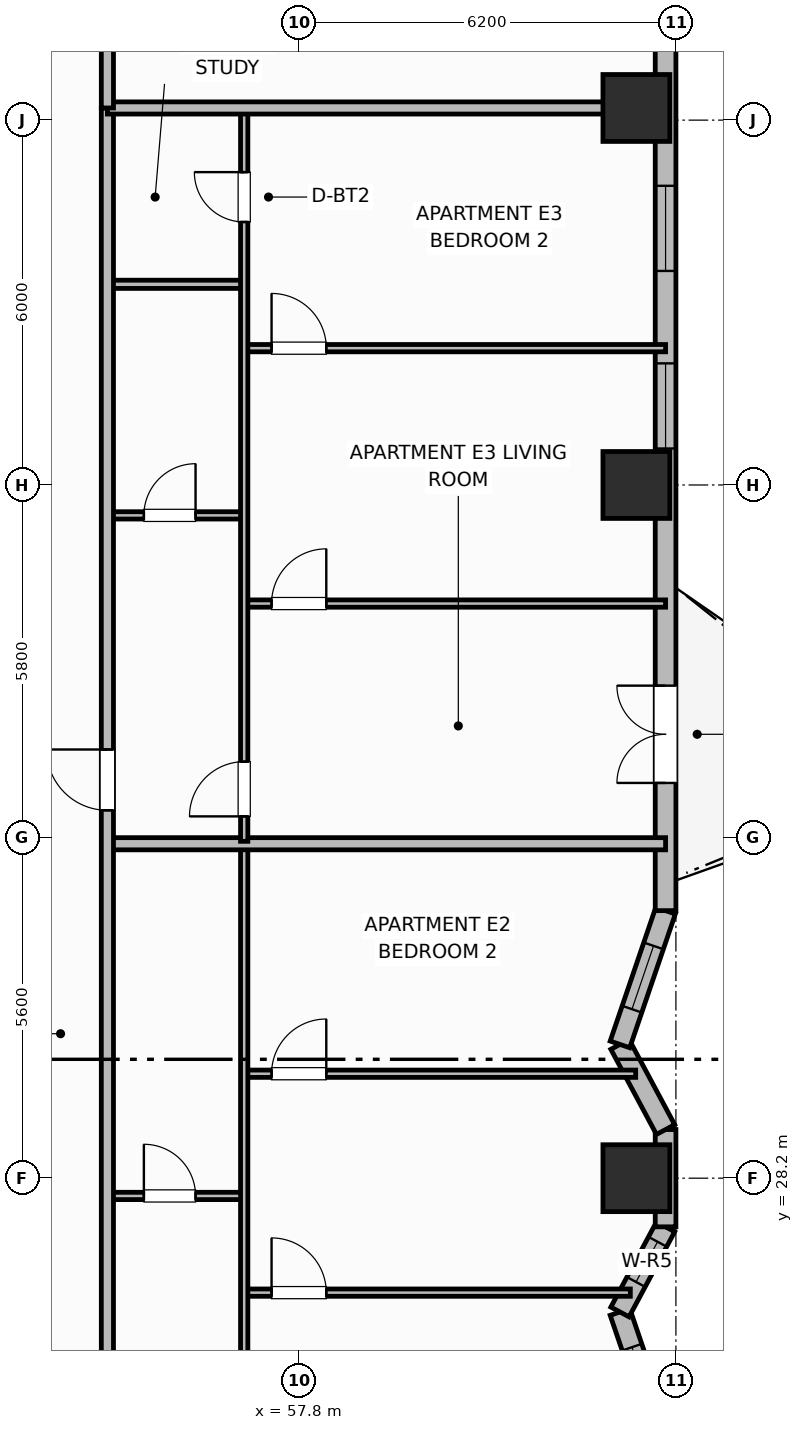
"""IFC4 building model, lengths in metres.
Left out: names, types, materials, properties, quantities, classifications, styles, units other than length and angle.
Written with IfcOpenShell. Run it as: python <this file> out.ifc"""

import sys

from ifc_helpers import new_model, si_unit, direction, frame, frame_2d, origin, origin_2d, place, context, subcontext, project, spatial, rectangle, extrude, element, fill, save


model = new_model("IFC4")
c1 = context("Model", 3, precision=1e-05, world=origin(), true_north=direction((0.0, 1.0)))
c2 = subcontext(c1, "Body", "Model", "MODEL_VIEW")
j1 = project(units=[si_unit("LENGTHUNIT", "METRE"), si_unit("PLANEANGLEUNIT", "RADIAN")], contexts=[c1])
p1 = place(None, origin())
s1 = spatial("IfcSite", under=j1, at=p1, CompositionType="ELEMENT")
p2 = place(p1, origin())
s2 = spatial("IfcBuilding", under=s1, at=p2, CompositionType="ELEMENT")
p3 = place(p2, frame((0.0, 0.0, 117.9)))
s3 = spatial("IfcBuildingStorey", under=s2, at=p3, CompositionType="ELEMENT", Elevation=117.9)
for number, where, z_axis, x_axis in (
    (1, (63.35, 28.2, 0.0), (0.0, 0.0, 1.0), (1.0, 0.0, 0.0)),
    (2, (63.35, 39.6, 0.0), (0.0, 0.0, 1.0), (1.0, 0.0, 0.0)),
    (3, (63.35, 45.8, 0.0), (0.0, 0.0, 1.0), (1.0, 0.0, 0.0)),
):
    element("IfcColumn", number, at=place(p3, frame(where, z_axis=z_axis, x_axis=x_axis)), inside=s3, PredefinedType="COLUMN", context=c2, shape_type="SweptSolid", body=[
        extrude(rectangle(XDim=1.1, YDim=1.1, at=origin_2d()), origin(), (0.0, 0.0, 1.0), 3.7),
    ])
p4 = place(p3, frame((63.83, 23.8, 0.0), z_axis=(0.0, 0.0, 1.0), x_axis=(-0.322680343871, 0.946508000853, 0.0)))
e4 = element("IfcWall", 4, at=p4, inside=s3, PredefinedType="SOLIDWALL", context=c2, shape_type="SweptSolid", body=[
    extrude(rectangle(XDim=2.324, YDim=0.34, at=frame_2d((1.162, 0.0))), origin(), (0.0, 0.0, 1.0), 2.7),
])
p5 = place(p4, frame((0.612, 0.0, 0.89)))
e5 = element("IfcOpeningElement", 5, at=p5, cuts=e4, PredefinedType="OPENING", context=c2, shape_type="SweptSolid", body=[
    extrude(rectangle(XDim=1.1, YDim=1.65, at=frame_2d((0.55, 0.825))), frame((0.0, 0.18, 0.0), z_axis=(0.0, -1.0, 0.0), x_axis=(1.0, 0.0, 0.0)), (0.0, 0.0, 1.0), 0.36),
])
p6 = place(p3, frame((63.08, 26.0, 0.0), z_axis=(0.0, 0.0, 1.0), x_axis=(0.472247007964, 0.881466257703, 0.0)))
e6 = element("IfcWall", 6, at=p6, inside=s3, PredefinedType="SOLIDWALL", context=c2, shape_type="SweptSolid", body=[
    extrude(rectangle(XDim=1.588, YDim=0.34, at=frame_2d((0.794, 0.0))), origin(), (0.0, 0.0, 1.0), 2.7),
])
p7 = place(p6, frame((0.56, 0.0, 0.89)))
e7 = element("IfcOpeningElement", 7, at=p7, cuts=e6, PredefinedType="OPENING", context=c2, shape_type="SweptSolid", body=[
    extrude(rectangle(XDim=0.75, YDim=1.65, at=frame_2d((0.375, 0.825))), frame((0.0, 0.18, 0.0), z_axis=(0.0, -1.0, 0.0), x_axis=(1.0, 0.0, 0.0)), (0.0, 0.0, 1.0), 0.36),
])
p8 = place(p3, frame((63.83, 27.4, 0.0), z_axis=(0.0, 0.0, 1.0), x_axis=(0.0, 1.0, 0.0)))
e8 = element("IfcWall", 8, at=p8, inside=s3, PredefinedType="SOLIDWALL", context=c2, shape_type="SweptSolid", body=[
    extrude(rectangle(XDim=1.6, YDim=0.34, at=frame_2d((0.8, 0.0))), origin(), (0.0, 0.0, 1.0), 2.7),
])
p9 = place(p3, frame((63.83, 29.0, 0.0), z_axis=(0.0, 0.0, 1.0), x_axis=(-0.472247007964, 0.881466257703, 0.0)))
e9 = element("IfcWall", 9, at=p9, inside=s3, PredefinedType="SOLIDWALL", context=c2, shape_type="SweptSolid", body=[
    extrude(rectangle(XDim=1.588, YDim=0.34, at=frame_2d((0.794, 0.0))), origin(), (0.0, 0.0, 1.0), 2.7),
])
p10 = place(p3, frame((63.08, 30.4, 0.0), z_axis=(0.0, 0.0, 1.0), x_axis=(0.32264826586, 0.946518936175, 0.0)))
e10 = element("IfcWall", 10, at=p10, inside=s3, PredefinedType="SOLIDWALL", context=c2, shape_type="SweptSolid", body=[
    extrude(rectangle(XDim=2.324, YDim=0.34, at=frame_2d((1.162, 0.0))), origin(), (0.0, 0.0, 1.0), 2.7),
])
p11 = place(p10, frame((0.612, 0.0, 0.89)))
e11 = element("IfcOpeningElement", 11, at=p11, cuts=e10, PredefinedType="OPENING", context=c2, shape_type="SweptSolid", body=[
    extrude(rectangle(XDim=1.1, YDim=1.65, at=frame_2d((0.55, 0.825))), frame((0.0, 0.18, 0.0), z_axis=(0.0, -1.0, 0.0), x_axis=(1.0, 0.0, 0.0)), (0.0, 0.0, 1.0), 0.36),
])
p12 = place(p3, frame((63.83, 32.6, 0.0), z_axis=(0.0, 0.0, 1.0), x_axis=(0.0, 1.0, 0.0)))
e12 = element("IfcWall", 12, at=p12, inside=s3, PredefinedType="SOLIDWALL", context=c2, shape_type="SweptSolid", body=[
    extrude(rectangle(XDim=14.8, YDim=0.34, at=frame_2d((7.4, 0.0))), origin(), (0.0, 0.0, 1.0), 2.7),
])
p13 = place(p12, frame((2.1, 0.0, 0.0)))
e13 = element("IfcOpeningElement", 13, at=p13, cuts=e12, PredefinedType="OPENING", context=c2, shape_type="SweptSolid", body=[
    extrude(rectangle(XDim=1.6, YDim=2.1, at=frame_2d((0.8, 1.05))), frame((0.0, 0.18, 0.0), z_axis=(0.0, -1.0, 0.0), x_axis=(1.0, 0.0, 0.0)), (0.0, 0.0, 1.0), 0.36),
])
p14 = place(p12, frame((7.6, 0.0, 0.69)))
e14 = element("IfcOpeningElement", 14, at=p14, cuts=e12, PredefinedType="OPENING", context=c2, shape_type="SweptSolid", body=[
    extrude(rectangle(XDim=1.4, YDim=1.85, at=frame_2d((0.7, 0.925))), frame((0.0, 0.18, 0.0), z_axis=(0.0, -1.0, 0.0), x_axis=(1.0, 0.0, 0.0)), (0.0, 0.0, 1.0), 0.36),
])
p15 = place(p12, frame((10.52, 0.0, 0.69)))
e15 = element("IfcOpeningElement", 15, at=p15, cuts=e12, PredefinedType="OPENING", context=c2, shape_type="SweptSolid", body=[
    extrude(rectangle(XDim=1.4, YDim=1.85, at=frame_2d((0.7, 0.925))), frame((0.0, 0.18, 0.0), z_axis=(0.0, -1.0, 0.0), x_axis=(1.0, 0.0, 0.0)), (0.0, 0.0, 1.0), 0.36),
])
p16 = place(p3, frame((54.65, 27.908, 0.0), z_axis=(0.0, 0.0, 1.0), x_axis=(1.0, 0.0, 0.0)))
e16 = element("IfcWall", 16, at=p16, inside=s3, PredefinedType="PARTITIONING", context=c2, shape_type="SweptSolid", body=[
    extrude(rectangle(XDim=2.25, YDim=0.12, at=frame_2d((1.125, 0.0))), origin(), (0.0, 0.0, 1.0), 2.53),
])
p17 = place(p16, frame((0.6, 0.0, 0.0)))
e17 = element("IfcOpeningElement", 17, at=p17, cuts=e16, PredefinedType="OPENING", context=c2, shape_type="SweptSolid", body=[
    extrude(rectangle(XDim=0.85, YDim=2.1, at=frame_2d((0.425, 1.05))), frame((0.0, 0.07, 0.0), z_axis=(0.0, -1.0, 0.0), x_axis=(1.0, 0.0, 0.0)), (0.0, 0.0, 1.0), 0.14),
])
p18 = place(p3, frame((56.9, 26.318, 0.0), z_axis=(0.0, 0.0, 1.0), x_axis=(1.0, 0.0, 0.0)))
e18 = element("IfcWall", 18, at=p18, inside=s3, PredefinedType="PARTITIONING", context=c2, shape_type="SweptSolid", body=[
    extrude(rectangle(XDim=6.351, YDim=0.12, at=frame_2d((3.175, 0.0))), origin(), (0.0, 0.0, 1.0), 2.53),
])
p19 = place(p18, frame((0.45, 0.0, 0.0)))
e19 = element("IfcOpeningElement", 19, at=p19, cuts=e18, PredefinedType="OPENING", context=c2, shape_type="SweptSolid", body=[
    extrude(rectangle(XDim=0.9, YDim=2.1, at=frame_2d((0.45, 1.05))), frame((0.0, 0.07, 0.0), z_axis=(0.0, -1.0, 0.0), x_axis=(1.0, 0.0, 0.0)), (0.0, 0.0, 1.0), 0.14),
])
p20 = place(p3, frame((56.9, 29.918, 0.0), z_axis=(0.0, 0.0, 1.0), x_axis=(1.0, 0.0, 0.0)))
e20 = element("IfcWall", 20, at=p20, inside=s3, PredefinedType="PARTITIONING", context=c2, shape_type="SweptSolid", body=[
    extrude(rectangle(XDim=6.438, YDim=0.12, at=frame_2d((3.219, 0.0))), origin(), (0.0, 0.0, 1.0), 2.53),
])
p21 = place(p20, frame((0.45, 0.0, 0.0)))
e21 = element("IfcOpeningElement", 21, at=p21, cuts=e20, PredefinedType="OPENING", context=c2, shape_type="SweptSolid", body=[
    extrude(rectangle(XDim=0.9, YDim=2.1, at=frame_2d((0.45, 1.05))), frame((0.0, 0.07, 0.0), z_axis=(0.0, -1.0, 0.0), x_axis=(1.0, 0.0, 0.0)), (0.0, 0.0, 1.0), 0.14),
])
p22 = place(p3, frame((56.9, 22.608, 0.0), z_axis=(0.0, 0.0, 1.0), x_axis=(0.0, 1.0, 0.0)))
e22 = element("IfcWall", 22, at=p22, inside=s3, PredefinedType="PARTITIONING", context=c2, shape_type="SweptSolid", body=[
    extrude(rectangle(XDim=11.052, YDim=0.12, at=frame_2d((5.526, 0.0))), origin(), (0.0, 0.0, 1.0), 2.53),
])
p23 = place(p22, frame((0.41, 0.0, 0.0)))
e23 = element("IfcOpeningElement", 23, at=p23, cuts=e22, PredefinedType="OPENING", context=c2, shape_type="SweptSolid", body=[
    extrude(rectangle(XDim=0.9, YDim=2.1, at=frame_2d((0.45, 1.05))), frame((0.0, 0.07, 0.0), z_axis=(0.0, -1.0, 0.0), x_axis=(1.0, 0.0, 0.0)), (0.0, 0.0, 1.0), 0.14),
])
p24 = place(p3, frame((54.65, 33.7, 0.0), z_axis=(0.0, 0.0, 1.0), x_axis=(1.0, 0.0, 0.0)))
e24 = element("IfcWall", 24, at=p24, inside=s3, PredefinedType="PARTITIONING", context=c2, shape_type="SweptSolid", body=[
    extrude(rectangle(XDim=9.18, YDim=0.2, at=frame_2d((4.59, 0.0))), origin(), (0.0, 0.0, 1.0), 2.53),
])
p25 = place(p3, frame((54.65, 39.1, 0.0), z_axis=(0.0, 0.0, 1.0), x_axis=(1.0, 0.0, 0.0)))
e25 = element("IfcWall", 25, at=p25, inside=s3, PredefinedType="PARTITIONING", context=c2, shape_type="SweptSolid", body=[
    extrude(rectangle(XDim=2.25, YDim=0.12, at=frame_2d((1.125, 0.0))), origin(), (0.0, 0.0, 1.0), 2.53),
])
p26 = place(p25, frame((0.6, 0.0, 0.0)))
e26 = element("IfcOpeningElement", 26, at=p26, cuts=e25, PredefinedType="OPENING", context=c2, shape_type="SweptSolid", body=[
    extrude(rectangle(XDim=0.85, YDim=2.1, at=frame_2d((0.425, 1.05))), frame((0.0, 0.07, 0.0), z_axis=(0.0, -1.0, 0.0), x_axis=(1.0, 0.0, 0.0)), (0.0, 0.0, 1.0), 0.14),
])
p27 = place(p3, frame((54.65, 42.9, 0.0), z_axis=(0.0, 0.0, 1.0), x_axis=(1.0, 0.0, 0.0)))
e27 = element("IfcWall", 27, at=p27, inside=s3, PredefinedType="PARTITIONING", context=c2, shape_type="SweptSolid", body=[
    extrude(rectangle(XDim=2.25, YDim=0.135, at=frame_2d((1.125, 0.0))), origin(), (0.0, 0.0, 1.0), 2.53),
])
p28 = place(p3, frame((56.9, 37.65, 0.0), z_axis=(0.0, 0.0, 1.0), x_axis=(1.0, 0.0, 0.0)))
e28 = element("IfcWall", 28, at=p28, inside=s3, PredefinedType="PARTITIONING", context=c2, shape_type="SweptSolid", body=[
    extrude(rectangle(XDim=6.93, YDim=0.12, at=frame_2d((3.465, 0.0))), origin(), (0.0, 0.0, 1.0), 2.53),
])
p29 = place(p28, frame((0.45, 0.0, 0.0)))
e29 = element("IfcOpeningElement", 29, at=p29, cuts=e28, PredefinedType="OPENING", context=c2, shape_type="SweptSolid", body=[
    extrude(rectangle(XDim=0.9, YDim=2.1, at=frame_2d((0.45, 1.05))), frame((0.0, 0.07, 0.0), z_axis=(0.0, -1.0, 0.0), x_axis=(1.0, 0.0, 0.0)), (0.0, 0.0, 1.0), 0.14),
])
p30 = place(p3, frame((56.9, 41.85, 0.0), z_axis=(0.0, 0.0, 1.0), x_axis=(1.0, 0.0, 0.0)))
e30 = element("IfcWall", 30, at=p30, inside=s3, PredefinedType="PARTITIONING", context=c2, shape_type="SweptSolid", body=[
    extrude(rectangle(XDim=6.93, YDim=0.12, at=frame_2d((3.465, 0.0))), origin(), (0.0, 0.0, 1.0), 2.53),
])
p31 = place(p30, frame((0.45, 0.0, 0.0)))
e31 = element("IfcOpeningElement", 31, at=p31, cuts=e30, PredefinedType="OPENING", context=c2, shape_type="SweptSolid", body=[
    extrude(rectangle(XDim=0.9, YDim=2.1, at=frame_2d((0.45, 1.05))), frame((0.0, 0.07, 0.0), z_axis=(0.0, -1.0, 0.0), x_axis=(1.0, 0.0, 0.0)), (0.0, 0.0, 1.0), 0.14),
])
p32 = place(p3, frame((56.9, 33.74, 0.0), z_axis=(0.0, 0.0, 1.0), x_axis=(0.0, 1.0, 0.0)))
e32 = element("IfcWall", 32, at=p32, inside=s3, PredefinedType="PARTITIONING", context=c2, shape_type="SweptSolid", body=[
    extrude(rectangle(XDim=12.02, YDim=0.12, at=frame_2d((6.01, 0.0))), origin(), (0.0, 0.0, 1.0), 2.53),
])
p33 = place(p32, frame((0.41, 0.0, 0.0)))
e33 = element("IfcOpeningElement", 33, at=p33, cuts=e32, PredefinedType="OPENING", context=c2, shape_type="SweptSolid", body=[
    extrude(rectangle(XDim=0.9, YDim=2.1, at=frame_2d((0.45, 1.05))), frame((0.0, 0.07, 0.0), z_axis=(0.0, -1.0, 0.0), x_axis=(1.0, 0.0, 0.0)), (0.0, 0.0, 1.0), 0.14),
])
p34 = place(p32, frame((10.185, 0.0, 0.0)))
e34 = element("IfcOpeningElement", 34, at=p34, cuts=e32, PredefinedType="OPENING", context=c2, shape_type="SweptSolid", body=[
    extrude(rectangle(XDim=0.82, YDim=2.08, at=frame_2d((0.41, 1.04))), frame((0.0, 0.07, 0.0), z_axis=(0.0, -1.0, 0.0), x_axis=(1.0, 0.0, 0.0)), (0.0, 0.0, 1.0), 0.14),
])
p35 = place(p3, frame((54.65, 10.6, 0.0), z_axis=(0.0, 0.0, 1.0), x_axis=(0.0, 1.0, 0.0)))
e35 = element("IfcWall", 35, at=p35, inside=s3, PredefinedType="PARTITIONING", context=c2, shape_type="SweptSolid", body=[
    extrude(rectangle(XDim=35.2, YDim=0.2, at=frame_2d((17.6, 0.0))), origin(), (0.0, 0.0, 1.0), 2.53),
])
p36 = place(p35, frame((2.65, 0.0, 0.0)))
e36 = element("IfcOpeningElement", 36, at=p36, cuts=e35, PredefinedType="OPENING", context=c2, shape_type="SweptSolid", body=[
    extrude(rectangle(XDim=1.0, YDim=2.15, at=frame_2d((0.5, 1.075))), frame((0.0, 0.11, 0.0), z_axis=(0.0, -1.0, 0.0), x_axis=(1.0, 0.0, 0.0)), (0.0, 0.0, 1.0), 0.22),
])
p37 = place(p35, frame((12.518, 0.0, 0.0)))
e37 = element("IfcOpeningElement", 37, at=p37, cuts=e35, PredefinedType="OPENING", context=c2, shape_type="SweptSolid", body=[
    extrude(rectangle(XDim=1.0, YDim=2.15, at=frame_2d((0.5, 1.075))), frame((0.0, 0.11, 0.0), z_axis=(0.0, -1.0, 0.0), x_axis=(1.0, 0.0, 0.0)), (0.0, 0.0, 1.0), 0.22),
])
p38 = place(p35, frame((23.65, 0.0, 0.0)))
e38 = element("IfcOpeningElement", 38, at=p38, cuts=e35, PredefinedType="OPENING", context=c2, shape_type="SweptSolid", body=[
    extrude(rectangle(XDim=1.0, YDim=2.15, at=frame_2d((0.5, 1.075))), frame((0.0, 0.11, 0.0), z_axis=(0.0, -1.0, 0.0), x_axis=(1.0, 0.0, 0.0)), (0.0, 0.0, 1.0), 0.22),
])
p39 = place(p3, frame((54.65, 45.8, 0.0), z_axis=(0.0, 0.0, 1.0), x_axis=(1.0, 0.0, 0.0)))
e39 = element("IfcWall", 39, at=p39, inside=s3, PredefinedType="PARTITIONING", context=c2, shape_type="SweptSolid", body=[
    extrude(rectangle(XDim=8.76, YDim=0.2, at=frame_2d((4.38, 0.0))), origin(), (0.0, 0.0, 1.0), 2.53),
])
p40 = place(p3, frame((54.65, 45.8, 0.0), z_axis=(0.0, 0.0, 1.0), x_axis=(0.0, 1.0, 0.0)))
e40 = element("IfcWall", 40, at=p40, inside=s3, PredefinedType="PARTITIONING", context=c2, shape_type="SweptSolid", body=[
    extrude(rectangle(XDim=5.63, YDim=0.2, at=frame_2d((2.815, 0.0))), origin(), (0.0, 0.0, 1.0), 2.53),
])
p41 = place(p5, origin())
e41 = element("IfcWindow", 41, at=p41, inside=s3, PartitioningType="SINGLE_PANEL", PredefinedType="WINDOW", context=c2, shape_type="SweptSolid", body=[
    extrude(rectangle(XDim=1.1, YDim=1.65, at=frame_2d((0.55, 0.825))), frame((0.0, 0.03, 0.0), z_axis=(0.0, -1.0, 0.0), x_axis=(1.0, 0.0, 0.0)), (0.0, 0.0, 1.0), 0.06),
])
fill(e5, e41)
p42 = place(p7, origin())
e42 = element("IfcWindow", 42, at=p42, inside=s3, PartitioningType="SINGLE_PANEL", PredefinedType="WINDOW", context=c2, shape_type="SweptSolid", body=[
    extrude(rectangle(XDim=0.75, YDim=1.65, at=frame_2d((0.375, 0.825))), frame((0.0, 0.03, 0.0), z_axis=(0.0, -1.0, 0.0), x_axis=(1.0, 0.0, 0.0)), (0.0, 0.0, 1.0), 0.06),
])
fill(e7, e42)
p43 = place(p11, origin())
e43 = element("IfcWindow", 43, at=p43, inside=s3, PartitioningType="SINGLE_PANEL", PredefinedType="WINDOW", context=c2, shape_type="SweptSolid", body=[
    extrude(rectangle(XDim=1.1, YDim=1.65, at=frame_2d((0.55, 0.825))), frame((0.0, 0.03, 0.0), z_axis=(0.0, -1.0, 0.0), x_axis=(1.0, 0.0, 0.0)), (0.0, 0.0, 1.0), 0.06),
])
fill(e11, e43)
p44 = place(p13, origin())
e44 = element("IfcDoor", 44, at=p44, inside=s3, OperationType="DOUBLE_DOOR_SINGLE_SWING", PredefinedType="DOOR", context=c2, shape_type="SweptSolid", body=[
    extrude(rectangle(XDim=1.6, YDim=2.1, at=frame_2d((0.8, 1.05))), frame((0.0, 0.025, 0.0), z_axis=(0.0, -1.0, 0.0), x_axis=(1.0, 0.0, 0.0)), (0.0, 0.0, 1.0), 0.05),
])
fill(e13, e44)
p45 = place(p14, origin())
e45 = element("IfcWindow", 45, at=p45, inside=s3, PartitioningType="SINGLE_PANEL", PredefinedType="WINDOW", context=c2, shape_type="SweptSolid", body=[
    extrude(rectangle(XDim=1.4, YDim=1.85, at=frame_2d((0.7, 0.925))), frame((0.0, 0.03, 0.0), z_axis=(0.0, -1.0, 0.0), x_axis=(1.0, 0.0, 0.0)), (0.0, 0.0, 1.0), 0.06),
])
fill(e14, e45)
p46 = place(p15, origin())
e46 = element("IfcWindow", 46, at=p46, inside=s3, PartitioningType="SINGLE_PANEL", PredefinedType="WINDOW", context=c2, shape_type="SweptSolid", body=[
    extrude(rectangle(XDim=1.4, YDim=1.85, at=frame_2d((0.7, 0.925))), frame((0.0, 0.03, 0.0), z_axis=(0.0, -1.0, 0.0), x_axis=(1.0, 0.0, 0.0)), (0.0, 0.0, 1.0), 0.06),
])
fill(e15, e46)
p47 = place(p17, origin())
e47 = element("IfcDoor", 47, at=p47, inside=s3, OperationType="SINGLE_SWING_LEFT", PredefinedType="DOOR", context=c2, shape_type="SweptSolid", body=[
    extrude(rectangle(XDim=0.85, YDim=2.1, at=frame_2d((0.425, 1.05))), frame((0.0, 0.025, 0.0), z_axis=(0.0, -1.0, 0.0), x_axis=(1.0, 0.0, 0.0)), (0.0, 0.0, 1.0), 0.05),
])
fill(e17, e47)
p48 = place(p19, origin())
e48 = element("IfcDoor", 48, at=p48, inside=s3, OperationType="SINGLE_SWING_LEFT", PredefinedType="DOOR", context=c2, shape_type="SweptSolid", body=[
    extrude(rectangle(XDim=0.9, YDim=2.1, at=frame_2d((0.45, 1.05))), frame((0.0, 0.025, 0.0), z_axis=(0.0, -1.0, 0.0), x_axis=(1.0, 0.0, 0.0)), (0.0, 0.0, 1.0), 0.05),
])
fill(e19, e48)
p49 = place(p21, origin())
e49 = element("IfcDoor", 49, at=p49, inside=s3, OperationType="SINGLE_SWING_RIGHT", PredefinedType="DOOR", context=c2, shape_type="SweptSolid", body=[
    extrude(rectangle(XDim=0.9, YDim=2.1, at=frame_2d((0.45, 1.05))), frame((0.0, 0.025, 0.0), z_axis=(0.0, -1.0, 0.0), x_axis=(1.0, 0.0, 0.0)), (0.0, 0.0, 1.0), 0.05),
])
fill(e21, e49)
p50 = place(p26, origin())
e50 = element("IfcDoor", 50, at=p50, inside=s3, OperationType="SINGLE_SWING_RIGHT", PredefinedType="DOOR", context=c2, shape_type="SweptSolid", body=[
    extrude(rectangle(XDim=0.85, YDim=2.1, at=frame_2d((0.425, 1.05))), frame((0.0, 0.025, 0.0), z_axis=(0.0, -1.0, 0.0), x_axis=(1.0, 0.0, 0.0)), (0.0, 0.0, 1.0), 0.05),
])
fill(e26, e50)
p51 = place(p29, origin())
e51 = element("IfcDoor", 51, at=p51, inside=s3, OperationType="SINGLE_SWING_RIGHT", PredefinedType="DOOR", context=c2, shape_type="SweptSolid", body=[
    extrude(rectangle(XDim=0.9, YDim=2.1, at=frame_2d((0.45, 1.05))), frame((0.0, 0.025, 0.0), z_axis=(0.0, -1.0, 0.0), x_axis=(1.0, 0.0, 0.0)), (0.0, 0.0, 1.0), 0.05),
])
fill(e29, e51)
p52 = place(p31, origin())
e52 = element("IfcDoor", 52, at=p52, inside=s3, OperationType="SINGLE_SWING_LEFT", PredefinedType="DOOR", context=c2, shape_type="SweptSolid", body=[
    extrude(rectangle(XDim=0.9, YDim=2.1, at=frame_2d((0.45, 1.05))), frame((0.0, 0.025, 0.0), z_axis=(0.0, -1.0, 0.0), x_axis=(1.0, 0.0, 0.0)), (0.0, 0.0, 1.0), 0.05),
])
fill(e31, e52)
p53 = place(p33, origin())
e53 = element("IfcDoor", 53, at=p53, inside=s3, OperationType="SINGLE_SWING_LEFT", PredefinedType="DOOR", context=c2, shape_type="SweptSolid", body=[
    extrude(rectangle(XDim=0.9, YDim=2.1, at=frame_2d((0.45, 1.05))), frame((0.0, 0.025, 0.0), z_axis=(0.0, -1.0, 0.0), x_axis=(1.0, 0.0, 0.0)), (0.0, 0.0, 1.0), 0.05),
])
fill(e33, e53)
p54 = place(p34, origin())
e54 = element("IfcDoor", 54, at=p54, inside=s3, OperationType="SINGLE_SWING_RIGHT", PredefinedType="DOOR", context=c2, shape_type="SweptSolid", body=[
    extrude(rectangle(XDim=0.82, YDim=2.08, at=frame_2d((0.41, 1.04))), frame((0.0, 0.025, 0.0), z_axis=(0.0, -1.0, 0.0), x_axis=(1.0, 0.0, 0.0)), (0.0, 0.0, 1.0), 0.05),
])
fill(e34, e54)
p55 = place(p38, origin())
e55 = element("IfcDoor", 55, at=p55, inside=s3, OperationType="SINGLE_SWING_RIGHT", PredefinedType="DOOR", context=c2, shape_type="SweptSolid", body=[
    extrude(rectangle(XDim=1.0, YDim=2.15, at=frame_2d((0.5, 1.075))), frame((0.0, 0.025, 0.0), z_axis=(0.0, -1.0, 0.0), x_axis=(1.0, 0.0, 0.0)), (0.0, 0.0, 1.0), 0.05),
])
fill(e38, e55)
save(model, sys.argv[1])
